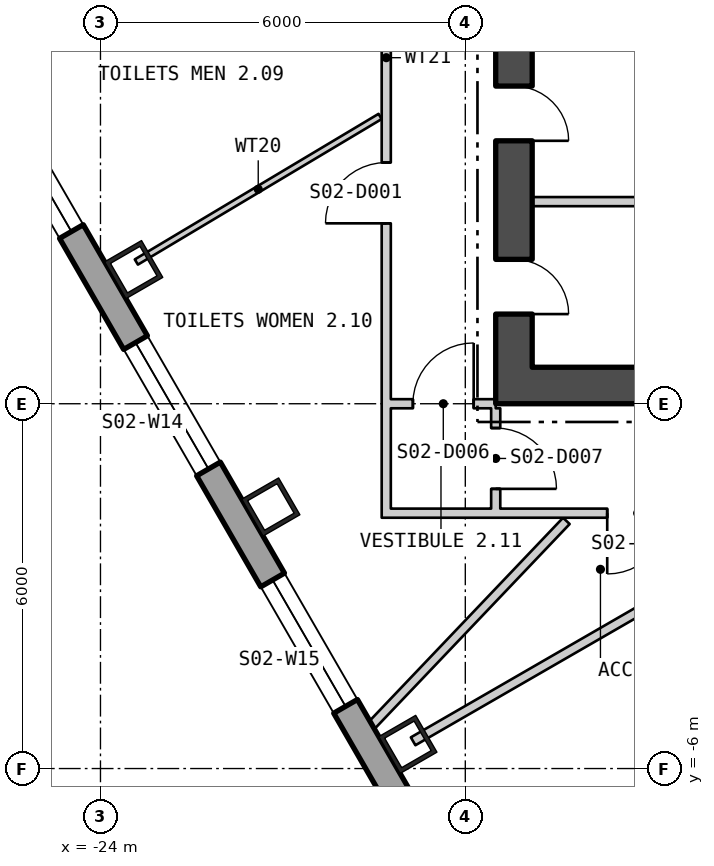
"""IFC4 building model, lengths in metres.
Left out: names, types, materials, properties, quantities, classifications, styles, units other than length and angle.
Written with IfcOpenShell. Run it as: python <this file> out.ifc"""

import sys

from ifc_helpers import new_model, si_unit, direction, frame, frame_2d, origin, origin_2d, place, context, subcontext, project, spatial, polyline, rectangle, hollow_rectangle, outline, extrude, element, fill, save


model = new_model("IFC4")
c1 = context("Model", 3, precision=1e-05, world=origin(), true_north=direction((0.0, 1.0)))
c2 = subcontext(c1, "Body", "Model", "MODEL_VIEW")
j1 = project(units=[si_unit("LENGTHUNIT", "METRE"), si_unit("PLANEANGLEUNIT", "RADIAN")], contexts=[c1])
p1 = place(None, origin())
s1 = spatial("IfcSite", under=j1, at=p1, CompositionType="ELEMENT")
p2 = place(p1, origin())
s2 = spatial("IfcBuilding", under=s1, at=p2, CompositionType="ELEMENT")
p3 = place(p2, frame((0.0, 0.0, 33.3)))
s3 = spatial("IfcBuildingStorey", under=s2, at=p3, CompositionType="ELEMENT", Elevation=33.3)
for number, where, z_axis, x_axis in (
    (1, (-23.453, 2.206, 0.0), (0.0, 0.0, 1.0), (0.5, -0.866, 0.0)),
    (2, (-21.198, -1.698, 0.0), (0.0, 0.0, 1.0), (0.5, -0.866, 0.0)),
    (3, (-18.944, -5.603, 0.0), (0.0, 0.0, 1.0), (0.5, -0.866, 0.0)),
):
    element("IfcColumn", number, at=place(p3, frame(where, z_axis=z_axis, x_axis=x_axis)), inside=s3, PredefinedType="COLUMN", context=c2, shape_type="SweptSolid", body=[
        extrude(hollow_rectangle(XDim=0.7, YDim=0.7, WallThickness=0.07, at=origin_2d()), origin(), (0.0, 0.0, 1.0), 4.5),
    ])
p4 = place(p3, frame((-28.625, 10.015, -0.18), z_axis=(0.0, 0.0, 1.0), x_axis=(0.500000335318, -0.866025210188, 0.0)))
e4 = element("IfcWall", 4, at=p4, inside=s3, PredefinedType="SOLIDWALL", context=c2, shape_type="SweptSolid", body=[
    extrude(outline(polyline([(-0.13, -0.225), (45.88, -0.225), (45.62, 0.225), (0.13, 0.225), (-0.13, -0.225)])), origin(), (0.0, 0.0, 1.0), 4.28),
])
p5 = place(p4, frame((1.425, 0.0, 1.08)))
e5 = element("IfcOpeningElement", 5, at=p5, cuts=e4, PredefinedType="OPENING", context=c2, shape_type="SweptSolid", body=[
    extrude(rectangle(XDim=2.4, YDim=2.6, at=frame_2d((1.2, 1.3))), frame((0.0, 0.235, 0.0), z_axis=(0.0, -1.0, 0.0), x_axis=(1.0, 0.0, 0.0)), (0.0, 0.0, 1.0), 0.47),
])
p6 = place(p4, frame((5.895, 0.0, 1.08)))
e6 = element("IfcOpeningElement", 6, at=p6, cuts=e4, PredefinedType="OPENING", context=c2, shape_type="SweptSolid", body=[
    extrude(rectangle(XDim=2.4, YDim=2.6, at=frame_2d((1.2, 1.3))), frame((0.0, 0.235, 0.0), z_axis=(0.0, -1.0, 0.0), x_axis=(1.0, 0.0, 0.0)), (0.0, 0.0, 1.0), 0.47),
])
p7 = place(p4, frame((10.403, 0.0, 1.08)))
e7 = element("IfcOpeningElement", 7, at=p7, cuts=e4, PredefinedType="OPENING", context=c2, shape_type="SweptSolid", body=[
    extrude(rectangle(XDim=2.4, YDim=2.6, at=frame_2d((1.2, 1.3))), frame((0.0, 0.235, 0.0), z_axis=(0.0, -1.0, 0.0), x_axis=(1.0, 0.0, 0.0)), (0.0, 0.0, 1.0), 0.47),
])
p8 = place(p4, frame((14.912, 0.0, 1.08)))
e8 = element("IfcOpeningElement", 8, at=p8, cuts=e4, PredefinedType="OPENING", context=c2, shape_type="SweptSolid", body=[
    extrude(rectangle(XDim=2.4, YDim=2.6, at=frame_2d((1.2, 1.3))), frame((0.0, 0.235, 0.0), z_axis=(0.0, -1.0, 0.0), x_axis=(1.0, 0.0, 0.0)), (0.0, 0.0, 1.0), 0.47),
])
p9 = place(p4, frame((19.421, 0.0, 1.08)))
e9 = element("IfcOpeningElement", 9, at=p9, cuts=e4, PredefinedType="OPENING", context=c2, shape_type="SweptSolid", body=[
    extrude(rectangle(XDim=2.4, YDim=2.6, at=frame_2d((1.2, 1.3))), frame((0.0, 0.235, 0.0), z_axis=(0.0, -1.0, 0.0), x_axis=(1.0, 0.0, 0.0)), (0.0, 0.0, 1.0), 0.47),
])
p10 = place(p4, frame((23.929, 0.0, 1.08)))
e10 = element("IfcOpeningElement", 10, at=p10, cuts=e4, PredefinedType="OPENING", context=c2, shape_type="SweptSolid", body=[
    extrude(rectangle(XDim=2.4, YDim=2.6, at=frame_2d((1.2, 1.3))), frame((0.0, 0.235, 0.0), z_axis=(0.0, -1.0, 0.0), x_axis=(1.0, 0.0, 0.0)), (0.0, 0.0, 1.0), 0.47),
])
p11 = place(p4, frame((28.438, 0.0, 1.08)))
e11 = element("IfcOpeningElement", 11, at=p11, cuts=e4, PredefinedType="OPENING", context=c2, shape_type="SweptSolid", body=[
    extrude(rectangle(XDim=2.4, YDim=2.6, at=frame_2d((1.2, 1.3))), frame((0.0, 0.235, 0.0), z_axis=(0.0, -1.0, 0.0), x_axis=(1.0, 0.0, 0.0)), (0.0, 0.0, 1.0), 0.47),
])
p12 = place(p4, frame((32.947, 0.0, 1.08)))
e12 = element("IfcOpeningElement", 12, at=p12, cuts=e4, PredefinedType="OPENING", context=c2, shape_type="SweptSolid", body=[
    extrude(rectangle(XDim=2.4, YDim=2.6, at=frame_2d((1.2, 1.3))), frame((0.0, 0.235, 0.0), z_axis=(0.0, -1.0, 0.0), x_axis=(1.0, 0.0, 0.0)), (0.0, 0.0, 1.0), 0.47),
])
p13 = place(p4, frame((37.455, 0.0, 1.08)))
e13 = element("IfcOpeningElement", 13, at=p13, cuts=e4, PredefinedType="OPENING", context=c2, shape_type="SweptSolid", body=[
    extrude(rectangle(XDim=2.4, YDim=2.6, at=frame_2d((1.2, 1.3))), frame((0.0, 0.235, 0.0), z_axis=(0.0, -1.0, 0.0), x_axis=(1.0, 0.0, 0.0)), (0.0, 0.0, 1.0), 0.47),
])
p14 = place(p4, frame((41.925, 0.0, 1.08)))
e14 = element("IfcOpeningElement", 14, at=p14, cuts=e4, PredefinedType="OPENING", context=c2, shape_type="SweptSolid", body=[
    extrude(rectangle(XDim=2.4, YDim=2.6, at=frame_2d((1.2, 1.3))), frame((0.0, 0.235, 0.0), z_axis=(0.0, -1.0, 0.0), x_axis=(1.0, 0.0, 0.0)), (0.0, 0.0, 1.0), 0.47),
])
p15 = place(p3, frame((-17.5, 0.3, 0.0), z_axis=(0.0, 0.0, 1.0), x_axis=(1.0, 0.0, 0.0)))
e15 = element("IfcWall", 15, at=p15, inside=s3, PredefinedType="SHEAR", context=c2, shape_type="SweptSolid", body=[
    extrude(rectangle(XDim=35.0, YDim=0.6, at=frame_2d((17.5, 0.0))), origin(), (0.0, 0.0, 1.0), 4.3),
])
p16 = place(p15, frame((12.0, 0.0, 0.0)))
e16 = element("IfcOpeningElement", 16, at=p16, cuts=e15, PredefinedType="OPENING", context=c2, shape_type="SweptSolid", body=[
    extrude(rectangle(XDim=1.8, YDim=2.4, at=frame_2d((0.9, 1.2))), frame((0.0, 0.31, 0.0), z_axis=(0.0, -1.0, 0.0), x_axis=(1.0, 0.0, 0.0)), (0.0, 0.0, 1.0), 0.62),
])
p17 = place(p15, frame((22.0, 0.0, 0.0)))
e17 = element("IfcOpeningElement", 17, at=p17, cuts=e15, PredefinedType="OPENING", context=c2, shape_type="SweptSolid", body=[
    extrude(rectangle(XDim=1.8, YDim=2.4, at=frame_2d((0.9, 1.2))), frame((0.0, 0.31, 0.0), z_axis=(0.0, -1.0, 0.0), x_axis=(1.0, 0.0, 0.0)), (0.0, 0.0, 1.0), 0.62),
])
p18 = place(p3, frame((-17.2, 0.6, 0.0), z_axis=(0.0, 0.0, 1.0), x_axis=(0.0, 1.0, 0.0)))
e18 = element("IfcWall", 18, at=p18, inside=s3, PredefinedType="SHEAR", context=c2, shape_type="SweptSolid", body=[
    extrude(rectangle(XDim=16.8, YDim=0.6, at=frame_2d((8.4, 0.0))), origin(), (0.0, 0.0, 1.0), 4.3),
])
p19 = place(p18, frame((5.7, 0.0, 0.0)))
e19 = element("IfcOpeningElement", 19, at=p19, cuts=e18, PredefinedType="OPENING", context=c2, shape_type="SweptSolid", body=[
    extrude(rectangle(XDim=1.5, YDim=2.1, at=frame_2d((0.75, 1.05))), frame((0.0, 0.31, 0.0), z_axis=(0.0, -1.0, 0.0), x_axis=(1.0, 0.0, 0.0)), (0.0, 0.0, 1.0), 0.62),
])
p20 = place(p18, frame((0.875, 0.0, 0.0)))
e20 = element("IfcOpeningElement", 20, at=p20, cuts=e18, PredefinedType="OPENING", context=c2, shape_type="SweptSolid", body=[
    extrude(rectangle(XDim=0.9, YDim=2.1, at=frame_2d((0.45, 1.05))), frame((0.0, 0.31, 0.0), z_axis=(0.0, -1.0, 0.0), x_axis=(1.0, 0.0, 0.0)), (0.0, 0.0, 1.0), 0.62),
])
p21 = place(p18, frame((3.724, 0.0, 0.0)))
e21 = element("IfcOpeningElement", 21, at=p21, cuts=e18, PredefinedType="OPENING", context=c2, shape_type="SweptSolid", body=[
    extrude(rectangle(XDim=0.9, YDim=2.1, at=frame_2d((0.45, 1.05))), frame((0.0, 0.31, 0.0), z_axis=(0.0, -1.0, 0.0), x_axis=(1.0, 0.0, 0.0)), (0.0, 0.0, 1.0), 0.62),
])
p22 = place(p18, frame((8.115, 0.0, 0.0)))
e22 = element("IfcOpeningElement", 22, at=p22, cuts=e18, PredefinedType="OPENING", context=c2, shape_type="SweptSolid", body=[
    extrude(rectangle(XDim=1.0, YDim=2.1, at=frame_2d((0.5, 1.05))), frame((0.0, 0.31, 0.0), z_axis=(0.0, -1.0, 0.0), x_axis=(1.0, 0.0, 0.0)), (0.0, 0.0, 1.0), 0.62),
])
p23 = place(p18, frame((11.528, 0.0, 0.0)))
e23 = element("IfcOpeningElement", 23, at=p23, cuts=e18, PredefinedType="OPENING", context=c2, shape_type="SweptSolid", body=[
    extrude(rectangle(XDim=0.9, YDim=2.1, at=frame_2d((0.45, 1.05))), frame((0.0, 0.31, 0.0), z_axis=(0.0, -1.0, 0.0), x_axis=(1.0, 0.0, 0.0)), (0.0, 0.0, 1.0), 0.62),
])
p24 = place(p18, frame((14.987, 0.0, 0.0)))
e24 = element("IfcOpeningElement", 24, at=p24, cuts=e18, PredefinedType="OPENING", context=c2, shape_type="SweptSolid", body=[
    extrude(rectangle(XDim=0.9, YDim=2.1, at=frame_2d((0.45, 1.05))), frame((0.0, 0.31, 0.0), z_axis=(0.0, -1.0, 0.0), x_axis=(1.0, 0.0, 0.0)), (0.0, 0.0, 1.0), 0.62),
])
p25 = place(p3, frame((-16.9, 3.324, 0.0), z_axis=(0.0, 0.0, 1.0), x_axis=(1.0, 0.0, 0.0)))
e25 = element("IfcWall", 25, at=p25, inside=s3, PredefinedType="PARTITIONING", context=c2, shape_type="SweptSolid", body=[
    extrude(rectangle(XDim=2.4, YDim=0.15, at=frame_2d((1.2, 0.0))), origin(), (0.0, 0.0, 1.0), 4.3),
])
p26 = place(p3, frame((-23.41, 2.331, 0.0), z_axis=(0.0, 0.0, 1.0), x_axis=(0.858568146325, 0.512699461786, 0.0)))
e26 = element("IfcWall", 26, at=p26, inside=s3, PredefinedType="PARTITIONING", context=c2, shape_type="SweptSolid", body=[
    extrude(rectangle(XDim=4.669, YDim=0.1, at=frame_2d((2.335, 0.0))), origin(), (0.0, 0.0, 1.0), 4.3),
])
p27 = place(p3, frame((-19.533, -5.282, 0.0), z_axis=(0.0, 0.0, 1.0), x_axis=(0.689628223258, 0.724163595941, 0.0)))
e27 = element("IfcWall", 27, at=p27, inside=s3, PredefinedType="PARTITIONING", context=c2, shape_type="SweptSolid", body=[
    extrude(rectangle(XDim=4.633, YDim=0.15, at=frame_2d((2.316, 0.0))), origin(), (0.0, 0.0, 1.0), 4.3),
])
p28 = place(p3, frame((-19.3, -1.875, 0.0), z_axis=(0.0, 0.0, 1.0), x_axis=(0.0, 1.0, 0.0)))
e28 = element("IfcWall", 28, at=p28, inside=s3, PredefinedType="PARTITIONING", context=c2, shape_type="SweptSolid", body=[
    extrude(rectangle(XDim=15.133, YDim=0.15, at=frame_2d((7.566, 0.0))), origin(), (0.0, 0.0, 1.0), 4.3),
])
p29 = place(p28, frame((4.842, 0.0, 0.0)))
e29 = element("IfcOpeningElement", 29, at=p29, cuts=e28, PredefinedType="OPENING", context=c2, shape_type="SweptSolid", body=[
    extrude(rectangle(XDim=1.0, YDim=2.1, at=frame_2d((0.5, 1.05))), frame((0.0, 0.085, 0.0), z_axis=(0.0, -1.0, 0.0), x_axis=(1.0, 0.0, 0.0)), (0.0, 0.0, 1.0), 0.17),
])
p30 = place(p28, frame((8.671, 0.0, 0.0)))
e30 = element("IfcOpeningElement", 30, at=p30, cuts=e28, PredefinedType="OPENING", context=c2, shape_type="SweptSolid", body=[
    extrude(rectangle(XDim=1.0, YDim=2.1, at=frame_2d((0.5, 1.05))), frame((0.0, 0.085, 0.0), z_axis=(0.0, -1.0, 0.0), x_axis=(1.0, 0.0, 0.0)), (0.0, 0.0, 1.0), 0.17),
])
p31 = place(p28, frame((12.857, 0.0, 0.0)))
e31 = element("IfcOpeningElement", 31, at=p31, cuts=e28, PredefinedType="OPENING", context=c2, shape_type="SweptSolid", body=[
    extrude(rectangle(XDim=1.0, YDim=2.1, at=frame_2d((0.5, 1.05))), frame((0.0, 0.085, 0.0), z_axis=(0.0, -1.0, 0.0), x_axis=(1.0, 0.0, 0.0)), (0.0, 0.0, 1.0), 0.17),
])
p32 = place(p3, frame((-19.225, -1.8, 0.0), z_axis=(0.0, 0.0, 1.0), x_axis=(1.0, 0.0, 0.0)))
e32 = element("IfcWall", 32, at=p32, inside=s3, PredefinedType="PARTITIONING", context=c2, shape_type="SweptSolid", body=[
    extrude(rectangle(XDim=11.21, YDim=0.15, at=frame_2d((5.605, 0.0))), origin(), (0.0, 0.0, 1.0), 4.3),
])
p33 = place(p32, frame((3.559, 0.0, 0.0)))
e33 = element("IfcOpeningElement", 33, at=p33, cuts=e32, PredefinedType="OPENING", context=c2, shape_type="SweptSolid", body=[
    extrude(rectangle(XDim=1.0, YDim=2.1, at=frame_2d((0.5, 1.05))), frame((0.0, 0.085, 0.0), z_axis=(0.0, -1.0, 0.0), x_axis=(1.0, 0.0, 0.0)), (0.0, 0.0, 1.0), 0.17),
])
p34 = place(p3, frame((-19.225, 0.0, 0.0), z_axis=(0.0, 0.0, 1.0), x_axis=(1.0, 0.0, 0.0)))
e34 = element("IfcWall", 34, at=p34, inside=s3, PredefinedType="PARTITIONING", context=c2, shape_type="SweptSolid", body=[
    extrude(rectangle(XDim=1.725, YDim=0.15, at=frame_2d((0.863, 0.0))), origin(), (0.0, 0.0, 1.0), 3.61),
])
p35 = place(p34, frame((0.363, 0.0, 0.0)))
e35 = element("IfcOpeningElement", 35, at=p35, cuts=e34, PredefinedType="OPENING", context=c2, shape_type="SweptSolid", body=[
    extrude(rectangle(XDim=1.0, YDim=2.1, at=frame_2d((0.5, 1.05))), frame((0.0, 0.085, 0.0), z_axis=(0.0, -1.0, 0.0), x_axis=(1.0, 0.0, 0.0)), (0.0, 0.0, 1.0), 0.17),
])
p36 = place(p3, frame((-18.858, -5.552, 0.0), z_axis=(0.0, 0.0, 1.0), x_axis=(0.866088799389, 0.499890179513, 0.0)))
e36 = element("IfcWall", 36, at=p36, inside=s3, PredefinedType="PARTITIONING", context=c2, shape_type="SweptSolid", body=[
    extrude(rectangle(XDim=7.226, YDim=0.15, at=frame_2d((3.613, 0.0))), origin(), (0.0, 0.0, 1.0), 4.3),
])
p37 = place(p3, frame((-17.5, -1.725, 0.0), z_axis=(0.0, 0.0, 1.0), x_axis=(0.0, 1.0, 0.0)))
e37 = element("IfcWall", 37, at=p37, inside=s3, PredefinedType="PARTITIONING", context=c2, shape_type="SweptSolid", body=[
    extrude(rectangle(XDim=1.65, YDim=0.15, at=frame_2d((0.825, 0.0))), origin(), (0.0, 0.0, 1.0), 4.3),
])
p38 = place(p37, frame((0.325, 0.0, 0.0)))
e38 = element("IfcOpeningElement", 38, at=p38, cuts=e37, PredefinedType="OPENING", context=c2, shape_type="SweptSolid", body=[
    extrude(rectangle(XDim=1.0, YDim=2.1, at=frame_2d((0.5, 1.05))), frame((0.0, 0.085, 0.0), z_axis=(0.0, -1.0, 0.0), x_axis=(1.0, 0.0, 0.0)), (0.0, 0.0, 1.0), 0.17),
])
p39 = place(p6, origin())
e39 = element("IfcWindow", 39, at=p39, inside=s3, PartitioningType="SINGLE_PANEL", PredefinedType="WINDOW", context=c2, shape_type="SweptSolid", body=[
    extrude(rectangle(XDim=2.4, YDim=2.6, at=frame_2d((1.2, 1.3))), frame((0.0, 0.105, 0.0), z_axis=(0.0, -1.0, 0.0), x_axis=(1.0, 0.0, 0.0)), (0.0, 0.0, 1.0), 0.06),
])
fill(e6, e39)
p40 = place(p7, origin())
e40 = element("IfcWindow", 40, at=p40, inside=s3, PartitioningType="SINGLE_PANEL", PredefinedType="WINDOW", context=c2, shape_type="SweptSolid", body=[
    extrude(rectangle(XDim=2.4, YDim=2.6, at=frame_2d((1.2, 1.3))), frame((0.0, 0.105, 0.0), z_axis=(0.0, -1.0, 0.0), x_axis=(1.0, 0.0, 0.0)), (0.0, 0.0, 1.0), 0.06),
])
fill(e7, e40)
p41 = place(p8, origin())
e41 = element("IfcWindow", 41, at=p41, inside=s3, PartitioningType="SINGLE_PANEL", PredefinedType="WINDOW", context=c2, shape_type="SweptSolid", body=[
    extrude(rectangle(XDim=2.4, YDim=2.6, at=frame_2d((1.2, 1.3))), frame((0.0, 0.105, 0.0), z_axis=(0.0, -1.0, 0.0), x_axis=(1.0, 0.0, 0.0)), (0.0, 0.0, 1.0), 0.06),
])
fill(e8, e41)
p42 = place(p20, origin())
e42 = element("IfcDoor", 42, at=p42, inside=s3, OperationType="SINGLE_SWING_LEFT", PredefinedType="DOOR", context=c2, shape_type="SweptSolid", body=[
    extrude(rectangle(XDim=0.9, YDim=2.1, at=frame_2d((0.45, 1.05))), frame((0.0, 0.025, 0.0), z_axis=(0.0, -1.0, 0.0), x_axis=(1.0, 0.0, 0.0)), (0.0, 0.0, 1.0), 0.05),
])
fill(e20, e42)
p43 = place(p21, origin())
e43 = element("IfcDoor", 43, at=p43, inside=s3, OperationType="SINGLE_SWING_LEFT", PredefinedType="DOOR", context=c2, shape_type="SweptSolid", body=[
    extrude(rectangle(XDim=0.9, YDim=2.1, at=frame_2d((0.45, 1.05))), frame((0.0, 0.025, 0.0), z_axis=(0.0, -1.0, 0.0), x_axis=(1.0, 0.0, 0.0)), (0.0, 0.0, 1.0), 0.05),
])
fill(e21, e43)
p44 = place(p29, origin())
e44 = element("IfcDoor", 44, at=p44, inside=s3, OperationType="SINGLE_SWING_RIGHT", PredefinedType="DOOR", context=c2, shape_type="SweptSolid", body=[
    extrude(rectangle(XDim=1.0, YDim=2.1, at=frame_2d((0.5, 1.05))), frame((0.0, 0.025, 0.0), z_axis=(0.0, -1.0, 0.0), x_axis=(1.0, 0.0, 0.0)), (0.0, 0.0, 1.0), 0.05),
])
fill(e29, e44)
p45 = place(p33, origin())
e45 = element("IfcDoor", 45, at=p45, inside=s3, OperationType="SINGLE_SWING_LEFT", PredefinedType="DOOR", context=c2, shape_type="SweptSolid", body=[
    extrude(rectangle(XDim=1.0, YDim=2.1, at=frame_2d((0.5, 1.05))), frame((0.0, 0.025, 0.0), z_axis=(0.0, -1.0, 0.0), x_axis=(1.0, 0.0, 0.0)), (0.0, 0.0, 1.0), 0.05),
])
fill(e33, e45)
p46 = place(p35, origin())
e46 = element("IfcDoor", 46, at=p46, inside=s3, OperationType="SINGLE_SWING_LEFT", PredefinedType="DOOR", context=c2, shape_type="SweptSolid", body=[
    extrude(rectangle(XDim=1.0, YDim=2.1, at=frame_2d((0.5, 1.05))), frame((0.0, 0.025, 0.0), z_axis=(0.0, -1.0, 0.0), x_axis=(1.0, 0.0, 0.0)), (0.0, 0.0, 1.0), 0.05),
])
fill(e35, e46)
p47 = place(p38, origin())
e47 = element("IfcDoor", 47, at=p47, inside=s3, OperationType="SINGLE_SWING_LEFT", PredefinedType="DOOR", context=c2, shape_type="SweptSolid", body=[
    extrude(rectangle(XDim=1.0, YDim=2.1, at=frame_2d((0.5, 1.05))), frame((0.0, 0.025, 0.0), z_axis=(0.0, -1.0, 0.0), x_axis=(1.0, 0.0, 0.0)), (0.0, 0.0, 1.0), 0.05),
])
fill(e38, e47)
save(model, sys.argv[1])
